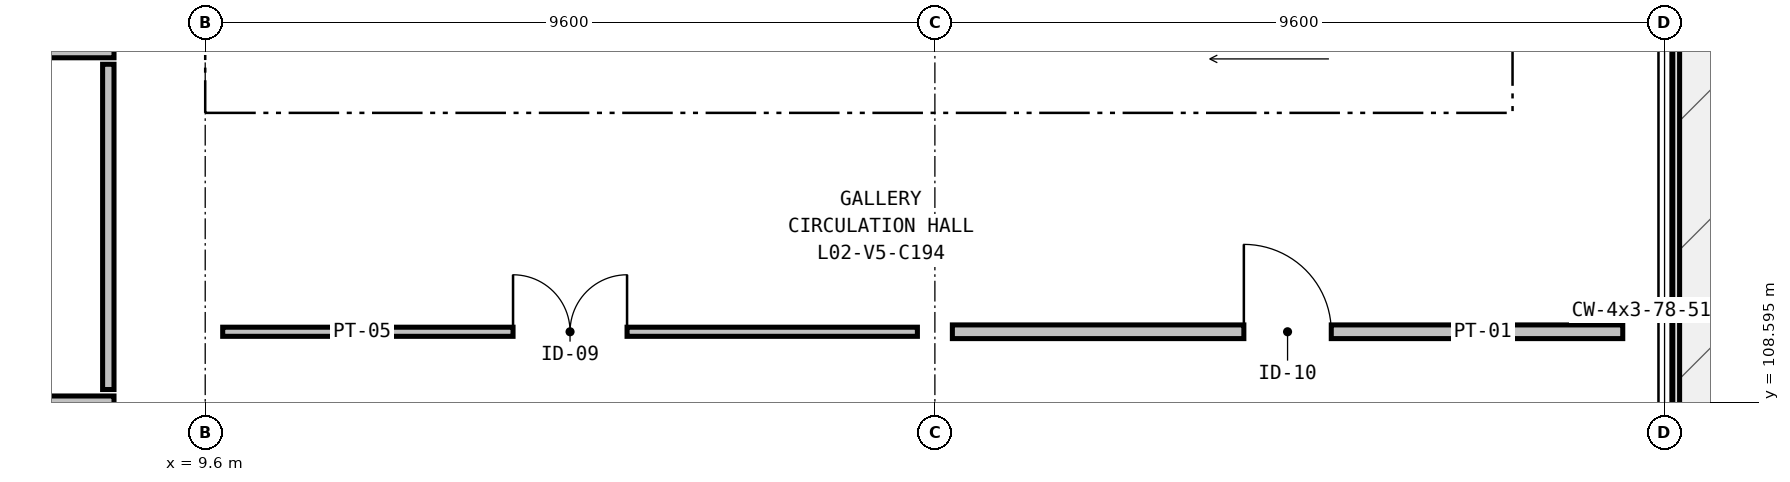
"""IFC4 building model, lengths in metres.
Left out: names, types, materials, properties, quantities, classifications, styles, units other than length and angle.
Written with IfcOpenShell. Run it as: python <this file> out.ifc"""

import sys

from ifc_helpers import new_model, si_unit, direction, frame, frame_2d, origin, place, context, subcontext, project, spatial, rectangle, extrude, element, fill, save


model = new_model("IFC4")
c1 = context("Model", 3, precision=1e-05, world=origin(), true_north=direction((0.0, 1.0)))
c2 = subcontext(c1, "Body", "Model", "MODEL_VIEW")
j1 = project(units=[si_unit("LENGTHUNIT", "METRE"), si_unit("PLANEANGLEUNIT", "RADIAN")], contexts=[c1])
p1 = place(None, origin())
s1 = spatial("IfcSite", under=j1, at=p1, CompositionType="ELEMENT")
p2 = place(p1, origin())
s2 = spatial("IfcBuilding", under=s1, at=p2, CompositionType="ELEMENT")
p3 = place(p2, frame((0.0, 0.0, 11.4)))
s3 = spatial("IfcBuildingStorey", under=s2, at=p3, CompositionType="ELEMENT", Elevation=11.4)
p4 = place(p3, frame((1.2, 113.2, 0.0), z_axis=(0.0, 0.0, 1.0), x_axis=(1.0, 0.0, 0.0)))
e1 = element("IfcWall", 1, at=p4, inside=s3, PredefinedType="PARTITIONING", context=c2, shape_type="SweptSolid", body=[
    extrude(rectangle(XDim=7.2, YDim=0.15, at=frame_2d((3.6, 0.0))), origin(), (0.0, 0.0, 1.0), 5.1),
])
p5 = place(p4, frame((1.35, 0.0, 0.0)))
e2 = element("IfcOpeningElement", 2, at=p5, cuts=e1, PredefinedType="OPENING", context=c2, shape_type="SweptSolid", body=[
    extrude(rectangle(XDim=0.9, YDim=2.1, at=frame_2d((0.45, 1.05))), frame((0.0, 0.085, 0.0), z_axis=(0.0, -1.0, 0.0), x_axis=(1.0, 0.0, 0.0)), (0.0, 0.0, 1.0), 0.17),
])
p6 = place(p4, frame((4.925, 0.0, 0.0)))
e3 = element("IfcOpeningElement", 3, at=p6, cuts=e1, PredefinedType="OPENING", context=c2, shape_type="SweptSolid", body=[
    extrude(rectangle(XDim=0.95, YDim=2.15, at=frame_2d((0.475, 1.075))), frame((0.0, 0.085, 0.0), z_axis=(0.0, -1.0, 0.0), x_axis=(1.0, 0.0, 0.0)), (0.0, 0.0, 1.0), 0.17),
])
p7 = place(p3, frame((1.2, 108.6, 0.0), z_axis=(0.0, 0.0, 1.0), x_axis=(1.0, 0.0, 0.0)))
e4 = element("IfcWall", 4, at=p7, inside=s3, PredefinedType="PARTITIONING", context=c2, shape_type="SweptSolid", body=[
    extrude(rectangle(XDim=7.2, YDim=0.15, at=frame_2d((3.6, 0.0))), origin(), (0.0, 0.0, 1.0), 5.1),
])
p8 = place(p3, frame((8.325, 108.76, 0.0), z_axis=(0.0, 0.0, 1.0), x_axis=(0.0, 1.0, 0.0)))
e5 = element("IfcWall", 5, at=p8, inside=s3, PredefinedType="PARTITIONING", context=c2, shape_type="SweptSolid", body=[
    extrude(rectangle(XDim=4.28, YDim=0.15, at=frame_2d((2.14, 0.0))), origin(), (0.0, 0.0, 1.0), 4.475),
])
p9 = place(p3, frame((9.83, 109.52, 0.0), z_axis=(0.0, 0.0, 1.0), x_axis=(1.0, 0.0, 0.0)))
e6 = element("IfcWall", 6, at=p9, inside=s3, PredefinedType="PARTITIONING", context=c2, shape_type="SweptSolid", body=[
    extrude(rectangle(XDim=9.14, YDim=0.12, at=frame_2d((4.57, 0.0))), origin(), (0.0, 0.0, 1.0), 4.375),
])
p10 = place(p9, frame((3.82, 0.0, 0.0)))
e7 = element("IfcOpeningElement", 7, at=p10, cuts=e6, PredefinedType="OPENING", context=c2, shape_type="SweptSolid", body=[
    extrude(rectangle(XDim=1.5, YDim=2.3, at=frame_2d((0.75, 1.15))), frame((0.0, 0.07, 0.0), z_axis=(0.0, -1.0, 0.0), x_axis=(1.0, 0.0, 0.0)), (0.0, 0.0, 1.0), 0.14),
])
p11 = place(p3, frame((19.43, 109.52, 0.0), z_axis=(0.0, 0.0, 1.0), x_axis=(1.0, 0.0, 0.0)))
e8 = element("IfcWall", 8, at=p11, inside=s3, PredefinedType="PARTITIONING", context=c2, shape_type="SweptSolid", body=[
    extrude(rectangle(XDim=8.82, YDim=0.18, at=frame_2d((4.41, 0.0))), origin(), (0.0, 0.0, 1.0), 5.1),
])
p12 = place(p11, frame((3.835, 0.0, 0.0)))
e9 = element("IfcOpeningElement", 9, at=p12, cuts=e8, PredefinedType="OPENING", context=c2, shape_type="SweptSolid", body=[
    extrude(rectangle(XDim=1.15, YDim=2.2, at=frame_2d((0.575, 1.1))), frame((0.0, 0.1, 0.0), z_axis=(0.0, -1.0, 0.0), x_axis=(1.0, 0.0, 0.0)), (0.0, 0.0, 1.0), 0.2),
])
p13 = place(p10, origin())
e10 = element("IfcDoor", 10, at=p13, inside=s3, OperationType="DOUBLE_DOOR_SINGLE_SWING", PredefinedType="DOOR", context=c2, shape_type="SweptSolid", body=[
    extrude(rectangle(XDim=1.5, YDim=2.3, at=frame_2d((0.75, 1.15))), frame((0.0, 0.025, 0.0), z_axis=(0.0, -1.0, 0.0), x_axis=(1.0, 0.0, 0.0)), (0.0, 0.0, 1.0), 0.05),
])
fill(e7, e10)
p14 = place(p12, origin())
e11 = element("IfcDoor", 11, at=p14, inside=s3, OperationType="SINGLE_SWING_LEFT", PredefinedType="DOOR", context=c2, shape_type="SweptSolid", body=[
    extrude(rectangle(XDim=1.15, YDim=2.2, at=frame_2d((0.575, 1.1))), frame((0.0, 0.025, 0.0), z_axis=(0.0, -1.0, 0.0), x_axis=(1.0, 0.0, 0.0)), (0.0, 0.0, 1.0), 0.05),
])
fill(e9, e11)
save(model, sys.argv[1])
